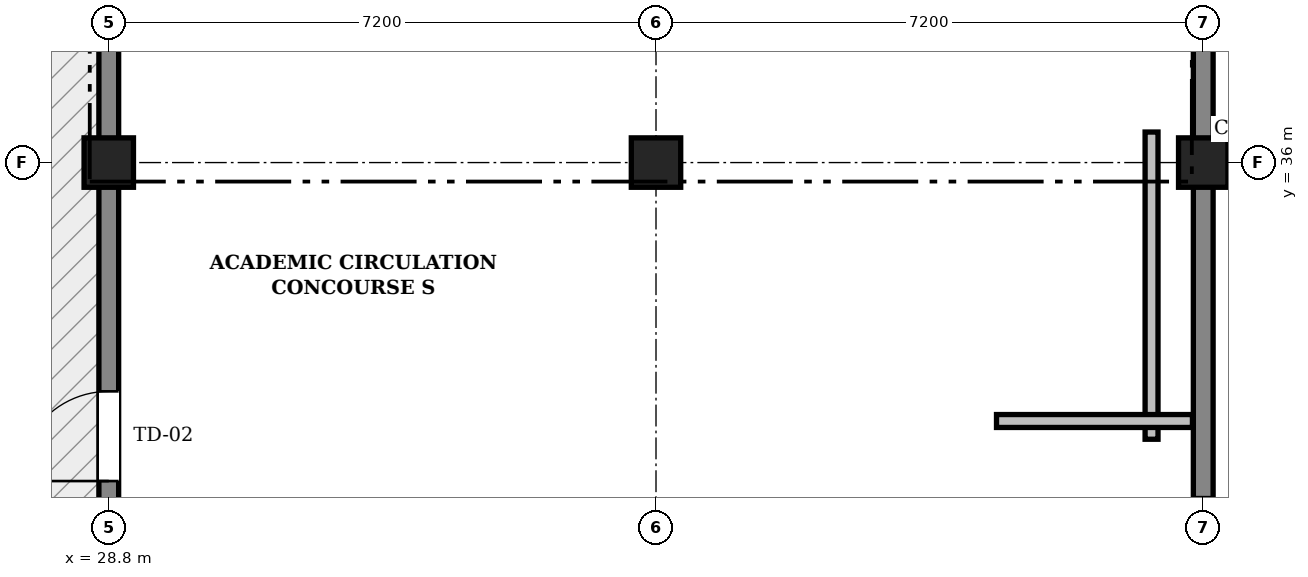
"""IFC4 building model, lengths in metres.
Left out: names, types, materials, properties, quantities, classifications, styles, units other than length and angle.
Written with IfcOpenShell. Run it as: python <this file> out.ifc"""

import sys

from ifc_helpers import new_model, si_unit, direction, frame, frame_2d, origin, origin_2d, place, context, subcontext, project, spatial, rectangle, extrude, element, fill, save


model = new_model("IFC4")
c1 = context("Model", 3, precision=1e-05, world=origin(), true_north=direction((0.0, 1.0)))
c2 = subcontext(c1, "Body", "Model", "MODEL_VIEW")
j1 = project(units=[si_unit("LENGTHUNIT", "METRE"), si_unit("PLANEANGLEUNIT", "RADIAN")], contexts=[c1])
p1 = place(None, origin())
s1 = spatial("IfcSite", under=j1, at=p1, CompositionType="ELEMENT")
p2 = place(p1, origin())
s2 = spatial("IfcBuilding", under=s1, at=p2, CompositionType="ELEMENT")
p3 = place(p2, frame((0.0, 0.0, 23.4)))
s3 = spatial("IfcBuildingStorey", under=s2, at=p3, CompositionType="ELEMENT", Elevation=23.4)
for number, where, z_axis, x_axis in (
    (1, (28.8, 36.0, 0.0), (0.0, 0.0, 1.0), (1.0, 0.0, 0.0)),
    (2, (36.0, 36.0, 0.0), (0.0, 0.0, 1.0), (1.0, 0.0, 0.0)),
    (3, (43.2, 36.0, 0.0), (0.0, 0.0, 1.0), (1.0, 0.0, 0.0)),
):
    element("IfcColumn", number, at=place(p3, frame(where, z_axis=z_axis, x_axis=x_axis)), inside=s3, PredefinedType="COLUMN", context=c2, shape_type="SweptSolid", body=[
        extrude(rectangle(XDim=0.65, YDim=0.65, at=origin_2d()), origin(), (0.0, 0.0, 1.0), 4.5),
    ])
p4 = place(p3, frame((43.2, 43.2, 0.0), z_axis=(0.0, 0.0, 1.0), x_axis=(0.0, -1.0, 0.0)))
e4 = element("IfcWall", 4, at=p4, inside=s3, PredefinedType="SOLIDWALL", context=c2, shape_type="SweptSolid", body=[
    extrude(rectangle(XDim=7.2, YDim=0.26, at=frame_2d((3.6, 0.0))), origin(), (0.0, 0.0, 1.0), 4.22),
])
p5 = place(p4, frame((2.9, 0.0, 0.95)))
e5 = element("IfcOpeningElement", 5, at=p5, cuts=e4, PredefinedType="OPENING", context=c2, shape_type="SweptSolid", body=[
    extrude(rectangle(XDim=1.4, YDim=1.55, at=frame_2d((0.7, 0.775))), frame((0.0, 0.142, 0.0), z_axis=(0.0, -1.0, 0.0), x_axis=(1.0, 0.0, 0.0)), (0.0, 0.0, 1.0), 0.284),
])
p6 = place(p3, frame((43.2, 36.0, 0.0), z_axis=(0.0, 0.0, 1.0), x_axis=(0.0, -1.0, 0.0)))
e6 = element("IfcWall", 6, at=p6, inside=s3, PredefinedType="SOLIDWALL", context=c2, shape_type="SweptSolid", body=[
    extrude(rectangle(XDim=7.034, YDim=0.26, at=frame_2d((3.517, 0.0))), origin(), (0.0, 0.0, 1.0), 4.22),
])
p7 = place(p6, frame((4.402, 0.0, 0.95)))
e7 = element("IfcOpeningElement", 7, at=p7, cuts=e6, PredefinedType="OPENING", context=c2, shape_type="SweptSolid", body=[
    extrude(rectangle(XDim=1.55, YDim=1.55, at=frame_2d((0.775, 0.775))), frame((0.0, 0.142, 0.0), z_axis=(0.0, -1.0, 0.0), x_axis=(1.0, 0.0, 0.0)), (0.0, 0.0, 1.0), 0.284),
])
p8 = place(p3, frame((28.8, 28.966, 0.0), z_axis=(0.0, 0.0, 1.0), x_axis=(0.0, 1.0, 0.0)))
e8 = element("IfcWall", 8, at=p8, inside=s3, PredefinedType="SOLIDWALL", context=c2, shape_type="SweptSolid", body=[
    extrude(rectangle(XDim=7.034, YDim=0.26, at=frame_2d((3.517, 0.0))), origin(), (0.0, 0.0, 1.0), 4.22),
])
p9 = place(p8, frame((2.844, 0.0, 0.0)))
e9 = element("IfcOpeningElement", 9, at=p9, cuts=e8, PredefinedType="OPENING", context=c2, shape_type="SweptSolid", body=[
    extrude(rectangle(XDim=1.18, YDim=2.18, at=frame_2d((0.59, 1.09))), frame((0.0, 0.142, 0.0), z_axis=(0.0, -1.0, 0.0), x_axis=(1.0, 0.0, 0.0)), (0.0, 0.0, 1.0), 0.284),
])
p10 = place(p3, frame((28.8, 36.0, 0.0), z_axis=(0.0, 0.0, 1.0), x_axis=(0.0, 1.0, 0.0)))
e10 = element("IfcWall", 10, at=p10, inside=s3, PredefinedType="SOLIDWALL", context=c2, shape_type="SweptSolid", body=[
    extrude(rectangle(XDim=7.2, YDim=0.26, at=frame_2d((3.6, 0.0))), origin(), (0.0, 0.0, 1.0), 4.22),
])
p11 = place(p10, frame((2.94, 0.0, 0.0)))
e11 = element("IfcOpeningElement", 11, at=p11, cuts=e10, PredefinedType="OPENING", context=c2, shape_type="SweptSolid", body=[
    extrude(rectangle(XDim=1.32, YDim=2.2, at=frame_2d((0.66, 1.1))), frame((0.0, 0.142, 0.0), z_axis=(0.0, -1.0, 0.0), x_axis=(1.0, 0.0, 0.0)), (0.0, 0.0, 1.0), 0.284),
])
p12 = place(p3, frame((42.52, 32.36, 0.0), z_axis=(0.0, 0.0, 1.0), x_axis=(0.0, 1.0, 0.0)))
e12 = element("IfcWall", 12, at=p12, inside=s3, PredefinedType="PARTITIONING", context=c2, shape_type="SweptSolid", body=[
    extrude(rectangle(XDim=4.042, YDim=0.17, at=frame_2d((2.021, 0.0))), origin(), (0.0, 0.0, 1.0), 4.16),
])
p13 = place(p3, frame((40.48, 32.6, 0.0), z_axis=(0.0, 0.0, 1.0), x_axis=(1.0, 0.0, 0.0)))
e13 = element("IfcWall", 13, at=p13, inside=s3, PredefinedType="PARTITIONING", context=c2, shape_type="SweptSolid", body=[
    extrude(rectangle(XDim=2.578, YDim=0.17, at=frame_2d((1.289, 0.0))), origin(), (0.0, 0.0, 1.0), 4.16),
])
p14 = place(p9, origin())
e14 = element("IfcDoor", 14, at=p14, inside=s3, OperationType="SINGLE_SWING_LEFT", PredefinedType="DOOR", context=c2, shape_type="SweptSolid", body=[
    extrude(rectangle(XDim=1.18, YDim=2.18, at=frame_2d((0.59, 1.09))), frame((0.0, 0.025, 0.0), z_axis=(0.0, -1.0, 0.0), x_axis=(1.0, 0.0, 0.0)), (0.0, 0.0, 1.0), 0.05),
])
fill(e9, e14)
save(model, sys.argv[1])
